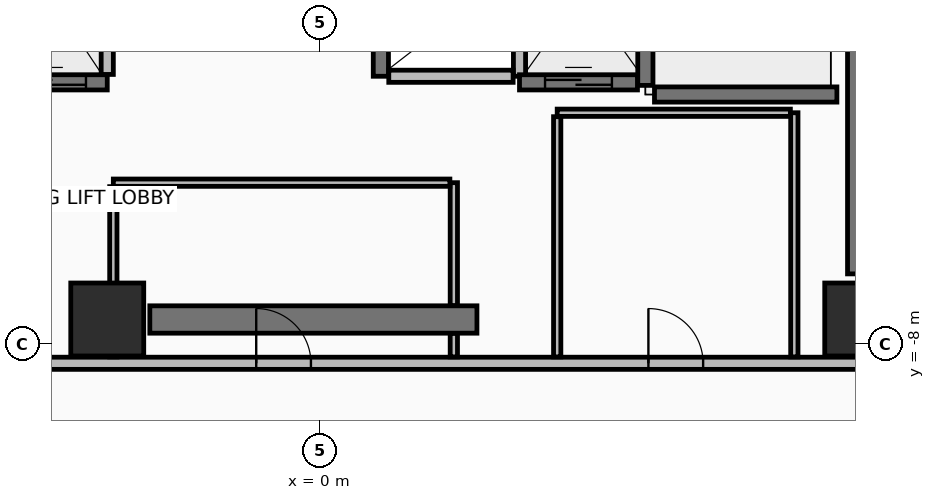
"""IFC4 building model, lengths in metres.
Left out: names, types, materials, properties, quantities, classifications, styles, units other than length and angle.
Written with IfcOpenShell. Run it as: python <this file> out.ifc"""

import sys

from ifc_helpers import new_model, si_unit, direction, frame, frame_2d, origin, origin_2d, place, context, subcontext, project, spatial, rectangle, extrude, element, fill, save


model = new_model("IFC4")
c1 = context("Model", 3, precision=1e-05, world=origin(), true_north=direction((0.0, 1.0)))
c2 = subcontext(c1, "Body", "Model", "MODEL_VIEW")
j1 = project(units=[si_unit("LENGTHUNIT", "METRE"), si_unit("PLANEANGLEUNIT", "RADIAN")], contexts=[c1])
p1 = place(None, origin())
s1 = spatial("IfcSite", under=j1, at=p1, CompositionType="ELEMENT")
p2 = place(p1, origin())
s2 = spatial("IfcBuilding", under=s1, at=p2, CompositionType="ELEMENT")
p3 = place(p2, frame((0.0, 0.0, 184.9)))
s3 = spatial("IfcBuildingStorey", under=s2, at=p3, CompositionType="ELEMENT", Elevation=184.9)
for number, where, z_axis, x_axis in (
    (1, (-3.5, -7.6, 0.0), (0.0, 0.0, 1.0), (1.0, 0.0, 0.0)),
    (2, (8.9, -7.6, 0.0), (0.0, 0.0, 1.0), (1.0, 0.0, 0.0)),
):
    element("IfcColumn", number, at=place(p3, frame(where, z_axis=z_axis, x_axis=x_axis)), inside=s3, PredefinedType="COLUMN", context=c2, shape_type="SweptSolid", body=[
        extrude(rectangle(XDim=1.2, YDim=1.2, at=origin_2d()), origin(), (0.0, 0.0, 1.0), 3.6),
    ])
p4 = place(p3, frame((-2.8, -7.6, 0.0), z_axis=(0.0, 0.0, 1.0), x_axis=(1.0, 0.0, 0.0)))
e3 = element("IfcWall", 3, at=p4, inside=s3, PredefinedType="SHEAR", context=c2, shape_type="SweptSolid", body=[
    extrude(rectangle(XDim=5.38, YDim=0.45, at=frame_2d((2.69, 0.0))), origin(), (0.0, 0.0, 1.0), 3.42),
])
p5 = place(p3, frame((8.9, -6.85, 0.0), z_axis=(0.0, 0.0, 1.0), x_axis=(0.0, 1.0, 0.0)))
e4 = element("IfcWall", 4, at=p5, inside=s3, PredefinedType="SHEAR", context=c2, shape_type="SweptSolid", body=[
    extrude(rectangle(XDim=10.7, YDim=0.45, at=frame_2d((5.35, 0.0))), origin(), (0.0, 0.0, 1.0), 3.42),
])
p6 = place(p3, frame((-9.62, -8.32, 0.0), z_axis=(0.0, 0.0, 1.0), x_axis=(1.0, 0.0, 0.0)))
e5 = element("IfcWall", 5, at=p6, inside=s3, PredefinedType="PARTITIONING", context=c2, shape_type="SweptSolid", body=[
    extrude(rectangle(XDim=19.24, YDim=0.2, at=frame_2d((9.62, 0.0))), origin(), (0.0, 0.0, 1.0), 2.865),
])
p7 = place(p6, frame((8.57, 0.0, 0.0)))
e6 = element("IfcOpeningElement", 6, at=p7, cuts=e5, PredefinedType="OPENING", context=c2, shape_type="SweptSolid", body=[
    extrude(rectangle(XDim=0.9, YDim=2.1, at=frame_2d((0.45, 1.05))), frame((0.0, 0.11, 0.0), z_axis=(0.0, -1.0, 0.0), x_axis=(1.0, 0.0, 0.0)), (0.0, 0.0, 1.0), 0.22),
])
p8 = place(p6, frame((15.02, 0.0, 0.0)))
e7 = element("IfcOpeningElement", 7, at=p8, cuts=e5, PredefinedType="OPENING", context=c2, shape_type="SweptSolid", body=[
    extrude(rectangle(XDim=0.9, YDim=2.1, at=frame_2d((0.45, 1.05))), frame((0.0, 0.11, 0.0), z_axis=(0.0, -1.0, 0.0), x_axis=(1.0, 0.0, 0.0)), (0.0, 0.0, 1.0), 0.22),
])
p9 = place(p3, frame((5.35, -3.75, 0.0), z_axis=(0.0, 0.0, 1.0), x_axis=(0.0, 1.0, 0.0)))
e8 = element("IfcWall", 8, at=p9, inside=s3, PredefinedType="SHEAR", context=c2, shape_type="SweptSolid", body=[
    extrude(rectangle(XDim=7.3, YDim=0.25, at=frame_2d((3.65, 0.0))), origin(), (0.0, 0.0, 1.0), 3.42),
])
p10 = place(p3, frame((5.5, -3.9, 0.0), z_axis=(0.0, 0.0, 1.0), x_axis=(1.0, 0.0, 0.0)))
e9 = element("IfcWall", 9, at=p10, inside=s3, PredefinedType="SHEAR", context=c2, shape_type="SweptSolid", body=[
    extrude(rectangle(XDim=3.0, YDim=0.25, at=frame_2d((1.5, 0.0))), origin(), (0.0, 0.0, 1.0), 3.42),
])
p11 = place(p3, frame((1.0, -3.6, 0.0), z_axis=(0.0, 0.0, 1.0), x_axis=(0.0, 1.0, 0.0)))
e10 = element("IfcWall", 10, at=p11, inside=s3, PredefinedType="SHEAR", context=c2, shape_type="SweptSolid", body=[
    extrude(rectangle(XDim=1.8, YDim=0.25, at=frame_2d((0.9, 0.0))), origin(), (0.0, 0.0, 1.0), 3.42),
])
p12 = place(p3, frame((3.28, -3.6, 0.0), z_axis=(0.0, 0.0, 1.0), x_axis=(0.0, 1.0, 0.0)))
e11 = element("IfcWall", 11, at=p12, inside=s3, PredefinedType="PARTITIONING", context=c2, shape_type="SweptSolid", body=[
    extrude(rectangle(XDim=1.8, YDim=0.2, at=frame_2d((0.9, 0.0))), origin(), (0.0, 0.0, 1.0), 3.42),
])
p13 = place(p3, frame((1.13, -3.6, 0.0), z_axis=(0.0, 0.0, 1.0), x_axis=(1.0, 0.0, 0.0)))
e12 = element("IfcWall", 12, at=p13, inside=s3, PredefinedType="PARTITIONING", context=c2, shape_type="SweptSolid", body=[
    extrude(rectangle(XDim=2.045, YDim=0.2, at=frame_2d((1.022, 0.0))), origin(), (0.0, 0.0, 1.0), 3.42),
])
p14 = place(p3, frame((-5.4, -3.7, 0.0), z_axis=(0.0, 0.0, 1.0), x_axis=(1.0, 0.0, 0.0)))
e13 = element("IfcWall", 13, at=p14, inside=s3, PredefinedType="SHEAR", context=c2, shape_type="SweptSolid", body=[
    extrude(rectangle(XDim=1.9, YDim=0.25, at=frame_2d((0.95, 0.0))), origin(), (0.0, 0.0, 1.0), 3.42),
])
p15 = place(p14, frame((0.35, 0.0, 0.0)))
e14 = element("IfcOpeningElement", 14, at=p15, cuts=e13, PredefinedType="OPENING", context=c2, shape_type="SweptSolid", body=[
    extrude(rectangle(XDim=1.2, YDim=2.2, at=frame_2d((0.6, 1.1))), frame((0.0, 0.135, 0.0), z_axis=(0.0, -1.0, 0.0), x_axis=(1.0, 0.0, 0.0)), (0.0, 0.0, 1.0), 0.27),
])
p16 = place(p3, frame((-3.5, -3.57, 0.0), z_axis=(0.0, 0.0, 1.0), x_axis=(0.0, 1.0, 0.0)))
e15 = element("IfcWall", 15, at=p16, inside=s3, PredefinedType="PARTITIONING", context=c2, shape_type="SweptSolid", body=[
    extrude(rectangle(XDim=2.615, YDim=0.2, at=frame_2d((1.308, 0.0))), origin(), (0.0, 0.0, 1.0), 3.42),
])
p17 = place(p3, frame((3.28, -3.7, 0.0), z_axis=(0.0, 0.0, 1.0), x_axis=(1.0, 0.0, 0.0)))
e16 = element("IfcWall", 16, at=p17, inside=s3, PredefinedType="SHEAR", context=c2, shape_type="SweptSolid", body=[
    extrude(rectangle(XDim=1.94, YDim=0.25, at=frame_2d((0.97, 0.0))), origin(), (0.0, 0.0, 1.0), 3.42),
])
p18 = place(p17, frame((0.42, 0.0, 0.0)))
e17 = element("IfcOpeningElement", 17, at=p18, cuts=e16, PredefinedType="OPENING", context=c2, shape_type="SweptSolid", body=[
    extrude(rectangle(XDim=1.1, YDim=2.2, at=frame_2d((0.55, 1.1))), frame((0.0, 0.135, 0.0), z_axis=(0.0, -1.0, 0.0), x_axis=(1.0, 0.0, 0.0)), (0.0, 0.0, 1.0), 0.27),
])
p19 = place(p3, frame((2.2, -8.215, 0.0), z_axis=(0.0, 0.0, 1.0), x_axis=(0.0, 1.0, 0.0)))
e18 = element("IfcWall", 18, at=p19, inside=s3, PredefinedType="PARTITIONING", context=c2, shape_type="SweptSolid", body=[
    extrude(rectangle(XDim=0.385, YDim=0.12, at=frame_2d((0.192, 0.0))), origin(), (0.0, 0.0, 1.0), 2.715),
])
p20 = place(p3, frame((2.2, -7.37, 0.0), z_axis=(0.0, 0.0, 1.0), x_axis=(0.0, 1.0, 0.0)))
e19 = element("IfcWall", 19, at=p20, inside=s3, PredefinedType="PARTITIONING", context=c2, shape_type="SweptSolid", body=[
    extrude(rectangle(XDim=2.02, YDim=0.12, at=frame_2d((1.01, 0.0))), origin(), (0.0, 0.0, 1.0), 2.715),
])
p21 = place(p3, frame((2.135, -5.35, 0.0), z_axis=(0.0, 0.0, 1.0), x_axis=(-1.0, 0.0, 0.0)))
e20 = element("IfcWall", 20, at=p21, inside=s3, PredefinedType="PARTITIONING", context=c2, shape_type="SweptSolid", body=[
    extrude(rectangle(XDim=5.535, YDim=0.12, at=frame_2d((2.768, 0.0))), origin(), (0.0, 0.0, 1.0), 2.715),
])
p22 = place(p3, frame((-3.4, -5.415, 0.0), z_axis=(0.0, 0.0, 1.0), x_axis=(0.0, -1.0, 0.0)))
e21 = element("IfcWall", 21, at=p22, inside=s3, PredefinedType="PARTITIONING", context=c2, shape_type="SweptSolid", body=[
    extrude(rectangle(XDim=2.8, YDim=0.12, at=frame_2d((1.4, 0.0))), origin(), (0.0, 0.0, 1.0), 2.715),
])
p23 = place(p3, frame((7.8, -8.215, 0.0), z_axis=(0.0, 0.0, 1.0), x_axis=(0.0, 1.0, 0.0)))
e22 = element("IfcWall", 22, at=p23, inside=s3, PredefinedType="PARTITIONING", context=c2, shape_type="SweptSolid", body=[
    extrude(rectangle(XDim=4.015, YDim=0.12, at=frame_2d((2.008, 0.0))), origin(), (0.0, 0.0, 1.0), 2.715),
])
p24 = place(p3, frame((7.735, -4.2, 0.0), z_axis=(0.0, 0.0, 1.0), x_axis=(-1.0, 0.0, 0.0)))
e23 = element("IfcWall", 23, at=p24, inside=s3, PredefinedType="PARTITIONING", context=c2, shape_type="SweptSolid", body=[
    extrude(rectangle(XDim=3.835, YDim=0.12, at=frame_2d((1.917, 0.0))), origin(), (0.0, 0.0, 1.0), 3.42),
])
p25 = place(p3, frame((3.9, -4.265, 0.0), z_axis=(0.0, 0.0, 1.0), x_axis=(0.0, -1.0, 0.0)))
e24 = element("IfcWall", 24, at=p25, inside=s3, PredefinedType="PARTITIONING", context=c2, shape_type="SweptSolid", body=[
    extrude(rectangle(XDim=3.95, YDim=0.12, at=frame_2d((1.975, 0.0))), origin(), (0.0, 0.0, 1.0), 2.715),
])
p26 = place(p3, frame((29.304, -3.186, 0.0), z_axis=(0.0, 0.0, 1.0), x_axis=(-0.766042132119, -0.642790363819, 0.0)))
e25 = element("IfcWall", 25, at=p26, inside=s3, PredefinedType="PARTITIONING", context=c2, shape_type="SweptSolid", body=[
    extrude(rectangle(XDim=42.283, YDim=0.15, at=frame_2d((21.141, 0.0))), origin(), (0.0, 0.0, 1.0), 3.42),
])
p27 = place(p15, origin())
e26 = element("IfcDoor", 26, at=p27, inside=s3, OperationType="SLIDING_TO_RIGHT", PredefinedType="DOOR", context=c2, shape_type="SweptSolid", body=[
    extrude(rectangle(XDim=1.2, YDim=2.2, at=frame_2d((0.6, 1.1))), frame((0.0, 0.025, 0.0), z_axis=(0.0, -1.0, 0.0), x_axis=(1.0, 0.0, 0.0)), (0.0, 0.0, 1.0), 0.05),
])
fill(e14, e26)
p28 = place(p18, origin())
e27 = element("IfcDoor", 27, at=p28, inside=s3, OperationType="SLIDING_TO_LEFT", PredefinedType="DOOR", context=c2, shape_type="SweptSolid", body=[
    extrude(rectangle(XDim=1.1, YDim=2.2, at=frame_2d((0.55, 1.1))), frame((0.0, 0.025, 0.0), z_axis=(0.0, -1.0, 0.0), x_axis=(1.0, 0.0, 0.0)), (0.0, 0.0, 1.0), 0.05),
])
fill(e17, e27)
p29 = place(p7, origin())
e28 = element("IfcDoor", 28, at=p29, inside=s3, OperationType="SINGLE_SWING_LEFT", PredefinedType="DOOR", context=c2, shape_type="SweptSolid", body=[
    extrude(rectangle(XDim=0.9, YDim=2.1, at=frame_2d((0.45, 1.05))), frame((0.0, 0.025, 0.0), z_axis=(0.0, -1.0, 0.0), x_axis=(1.0, 0.0, 0.0)), (0.0, 0.0, 1.0), 0.05),
])
fill(e6, e28)
p30 = place(p8, origin())
e29 = element("IfcDoor", 29, at=p30, inside=s3, OperationType="SINGLE_SWING_LEFT", PredefinedType="DOOR", context=c2, shape_type="SweptSolid", body=[
    extrude(rectangle(XDim=0.9, YDim=2.1, at=frame_2d((0.45, 1.05))), frame((0.0, 0.025, 0.0), z_axis=(0.0, -1.0, 0.0), x_axis=(1.0, 0.0, 0.0)), (0.0, 0.0, 1.0), 0.05),
])
fill(e7, e29)
save(model, sys.argv[1])
